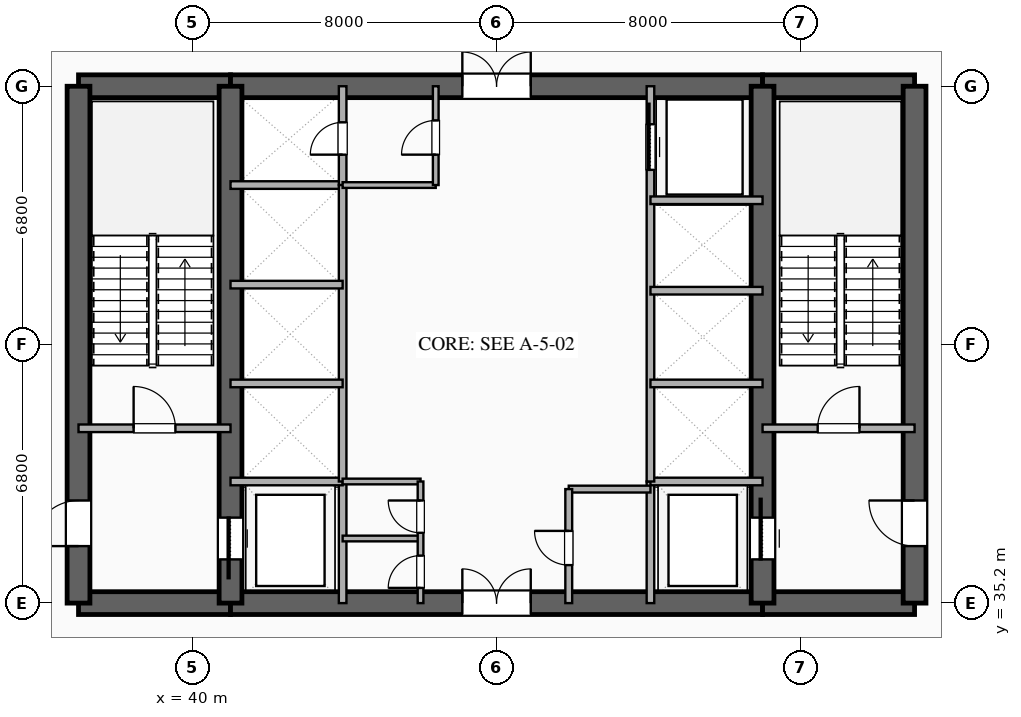
"""IFC4 building model, lengths in metres.
Left out: names, types, materials, properties, quantities, classifications, styles, units other than length and angle.
Written with IfcOpenShell. Run it as: python <this file> out.ifc"""

import sys

from ifc_helpers import new_model, si_unit, direction, frame, frame_2d, origin, place, context, subcontext, project, spatial, rectangle, extrude, element, fill, save


model = new_model("IFC4")
c1 = context("Model", 3, precision=1e-05, world=origin(), true_north=direction((0.0, 1.0)))
c2 = subcontext(c1, "Body", "Model", "MODEL_VIEW")
j1 = project(units=[si_unit("LENGTHUNIT", "METRE"), si_unit("PLANEANGLEUNIT", "RADIAN")], contexts=[c1])
p1 = place(None, origin())
s1 = spatial("IfcSite", under=j1, at=p1, CompositionType="ELEMENT")
p2 = place(p1, origin())
s2 = spatial("IfcBuilding", under=s1, at=p2, CompositionType="ELEMENT")
p3 = place(p2, frame((0.0, 0.0, -4.5)))
s3 = spatial("IfcBuildingStorey", under=s2, at=p3, CompositionType="ELEMENT", Elevation=-4.5)
p4 = place(p3, frame((37.0, 35.2, 0.0), z_axis=(0.0, 0.0, 1.0), x_axis=(1.0, 0.0, 0.0)))
e1 = element("IfcWall", 1, at=p4, inside=s3, PredefinedType="SHEAR", context=c2, shape_type="SweptSolid", body=[
    extrude(rectangle(XDim=4.0, YDim=0.6, at=frame_2d((2.0, 0.0))), origin(), (0.0, 0.0, 1.0), 4.22),
])
p5 = place(p3, frame((41.0, 35.2, 0.0), z_axis=(0.0, 0.0, 1.0), x_axis=(1.0, 0.0, 0.0)))
e2 = element("IfcWall", 2, at=p5, inside=s3, PredefinedType="SHEAR", context=c2, shape_type="SweptSolid", body=[
    extrude(rectangle(XDim=14.0, YDim=0.6, at=frame_2d((7.0, 0.0))), origin(), (0.0, 0.0, 1.0), 4.22),
])
p6 = place(p5, frame((6.1, 0.0, 0.0)))
e3 = element("IfcOpeningElement", 3, at=p6, cuts=e2, PredefinedType="OPENING", context=c2, shape_type="SweptSolid", body=[
    extrude(rectangle(XDim=1.8, YDim=2.25, at=frame_2d((0.9, 1.125))), frame((0.0, 0.31, 0.0), z_axis=(0.0, -1.0, 0.0), x_axis=(1.0, 0.0, 0.0)), (0.0, 0.0, 1.0), 0.62),
])
for number, where, z_axis, x_axis in (
    (4, (55.0, 35.2, 0.0), (0.0, 0.0, 1.0), (1.0, 0.0, 0.0)),
    (5, (37.0, 48.8, 0.0), (0.0, 0.0, 1.0), (1.0, 0.0, 0.0)),
):
    element("IfcWall", number, at=place(p3, frame(where, z_axis=z_axis, x_axis=x_axis)), inside=s3, PredefinedType="SHEAR", context=c2, shape_type="SweptSolid", body=[
        extrude(rectangle(XDim=4.0, YDim=0.6, at=frame_2d((2.0, 0.0))), origin(), (0.0, 0.0, 1.0), 4.22),
    ])
p7 = place(p3, frame((41.0, 48.8, 0.0), z_axis=(0.0, 0.0, 1.0), x_axis=(1.0, 0.0, 0.0)))
e6 = element("IfcWall", 6, at=p7, inside=s3, PredefinedType="SHEAR", context=c2, shape_type="SweptSolid", body=[
    extrude(rectangle(XDim=14.0, YDim=0.6, at=frame_2d((7.0, 0.0))), origin(), (0.0, 0.0, 1.0), 4.22),
])
p8 = place(p7, frame((6.1, 0.0, 0.0)))
e7 = element("IfcOpeningElement", 7, at=p8, cuts=e6, PredefinedType="OPENING", context=c2, shape_type="SweptSolid", body=[
    extrude(rectangle(XDim=1.8, YDim=2.25, at=frame_2d((0.9, 1.125))), frame((0.0, 0.31, 0.0), z_axis=(0.0, -1.0, 0.0), x_axis=(1.0, 0.0, 0.0)), (0.0, 0.0, 1.0), 0.62),
])
p9 = place(p3, frame((55.0, 48.8, 0.0), z_axis=(0.0, 0.0, 1.0), x_axis=(1.0, 0.0, 0.0)))
e8 = element("IfcWall", 8, at=p9, inside=s3, PredefinedType="SHEAR", context=c2, shape_type="SweptSolid", body=[
    extrude(rectangle(XDim=4.0, YDim=0.6, at=frame_2d((2.0, 0.0))), origin(), (0.0, 0.0, 1.0), 4.22),
])
p10 = place(p3, frame((37.0, 35.2, 0.0), z_axis=(0.0, 0.0, 1.0), x_axis=(0.0, 1.0, 0.0)))
e9 = element("IfcWall", 9, at=p10, inside=s3, PredefinedType="SHEAR", context=c2, shape_type="SweptSolid", body=[
    extrude(rectangle(XDim=13.6, YDim=0.6, at=frame_2d((6.8, 0.0))), origin(), (0.0, 0.0, 1.0), 4.22),
])
p11 = place(p10, frame((1.5, 0.0, 0.0)))
e10 = element("IfcOpeningElement", 10, at=p11, cuts=e9, PredefinedType="OPENING", context=c2, shape_type="SweptSolid", body=[
    extrude(rectangle(XDim=1.2, YDim=2.15, at=frame_2d((0.6, 1.075))), frame((0.0, 0.31, 0.0), z_axis=(0.0, -1.0, 0.0), x_axis=(1.0, 0.0, 0.0)), (0.0, 0.0, 1.0), 0.62),
])
p12 = place(p3, frame((59.0, 35.2, 0.0), z_axis=(0.0, 0.0, 1.0), x_axis=(0.0, 1.0, 0.0)))
e11 = element("IfcWall", 11, at=p12, inside=s3, PredefinedType="SHEAR", context=c2, shape_type="SweptSolid", body=[
    extrude(rectangle(XDim=13.6, YDim=0.6, at=frame_2d((6.8, 0.0))), origin(), (0.0, 0.0, 1.0), 4.22),
])
p13 = place(p12, frame((1.5, 0.0, 0.0)))
e12 = element("IfcOpeningElement", 12, at=p13, cuts=e11, PredefinedType="OPENING", context=c2, shape_type="SweptSolid", body=[
    extrude(rectangle(XDim=1.2, YDim=2.15, at=frame_2d((0.6, 1.075))), frame((0.0, 0.31, 0.0), z_axis=(0.0, -1.0, 0.0), x_axis=(1.0, 0.0, 0.0)), (0.0, 0.0, 1.0), 0.62),
])
p14 = place(p3, frame((41.0, 35.2, 0.0), z_axis=(0.0, 0.0, 1.0), x_axis=(0.0, 1.0, 0.0)))
e13 = element("IfcWall", 13, at=p14, inside=s3, PredefinedType="SHEAR", context=c2, shape_type="SweptSolid", body=[
    extrude(rectangle(XDim=13.6, YDim=0.6, at=frame_2d((6.8, 0.0))), origin(), (0.0, 0.0, 1.0), 4.22),
])
p15 = place(p14, frame((1.15, 0.0, 0.0)))
e14 = element("IfcOpeningElement", 14, at=p15, cuts=e13, PredefinedType="OPENING", context=c2, shape_type="SweptSolid", body=[
    extrude(rectangle(XDim=1.1, YDim=2.2, at=frame_2d((0.55, 1.1))), frame((0.0, 0.31, 0.0), z_axis=(0.0, -1.0, 0.0), x_axis=(1.0, 0.0, 0.0)), (0.0, 0.0, 1.0), 0.62),
])
p16 = place(p3, frame((55.0, 35.2, 0.0), z_axis=(0.0, 0.0, 1.0), x_axis=(0.0, 1.0, 0.0)))
e15 = element("IfcWall", 15, at=p16, inside=s3, PredefinedType="SHEAR", context=c2, shape_type="SweptSolid", body=[
    extrude(rectangle(XDim=13.6, YDim=0.6, at=frame_2d((6.8, 0.0))), origin(), (0.0, 0.0, 1.0), 4.22),
])
p17 = place(p16, frame((1.15, 0.0, 0.0)))
e16 = element("IfcOpeningElement", 16, at=p17, cuts=e15, PredefinedType="OPENING", context=c2, shape_type="SweptSolid", body=[
    extrude(rectangle(XDim=1.1, YDim=2.2, at=frame_2d((0.55, 1.1))), frame((0.0, 0.31, 0.0), z_axis=(0.0, -1.0, 0.0), x_axis=(1.0, 0.0, 0.0)), (0.0, 0.0, 1.0), 0.62),
])
p18 = place(p3, frame((37.0, 39.8, 0.0), z_axis=(0.0, 0.0, 1.0), x_axis=(1.0, 0.0, 0.0)))
e17 = element("IfcWall", 17, at=p18, inside=s3, PredefinedType="SOLIDWALL", context=c2, shape_type="SweptSolid", body=[
    extrude(rectangle(XDim=4.0, YDim=0.2, at=frame_2d((2.0, 0.0))), origin(), (0.0, 0.0, 1.0), 3.42),
])
p19 = place(p18, frame((1.45, 0.0, 0.0)))
e18 = element("IfcOpeningElement", 18, at=p19, cuts=e17, PredefinedType="OPENING", context=c2, shape_type="SweptSolid", body=[
    extrude(rectangle(XDim=1.1, YDim=2.15, at=frame_2d((0.55, 1.075))), frame((0.0, 0.11, 0.0), z_axis=(0.0, -1.0, 0.0), x_axis=(1.0, 0.0, 0.0)), (0.0, 0.0, 1.0), 0.22),
])
p20 = place(p3, frame((55.0, 39.8, 0.0), z_axis=(0.0, 0.0, 1.0), x_axis=(1.0, 0.0, 0.0)))
e19 = element("IfcWall", 19, at=p20, inside=s3, PredefinedType="SOLIDWALL", context=c2, shape_type="SweptSolid", body=[
    extrude(rectangle(XDim=4.0, YDim=0.2, at=frame_2d((2.0, 0.0))), origin(), (0.0, 0.0, 1.0), 3.42),
])
p21 = place(p20, frame((1.45, 0.0, 0.0)))
e20 = element("IfcOpeningElement", 20, at=p21, cuts=e19, PredefinedType="OPENING", context=c2, shape_type="SweptSolid", body=[
    extrude(rectangle(XDim=1.1, YDim=2.15, at=frame_2d((0.55, 1.075))), frame((0.0, 0.11, 0.0), z_axis=(0.0, -1.0, 0.0), x_axis=(1.0, 0.0, 0.0)), (0.0, 0.0, 1.0), 0.22),
])
p22 = place(p3, frame((43.95, 35.2, 0.0), z_axis=(0.0, 0.0, 1.0), x_axis=(0.0, 1.0, 0.0)))
e21 = element("IfcWall", 21, at=p22, inside=s3, PredefinedType="SOLIDWALL", context=c2, shape_type="SweptSolid", body=[
    extrude(rectangle(XDim=3.2, YDim=0.2, at=frame_2d((1.6, 0.0))), origin(), (0.0, 0.0, 1.0), 3.42),
])
p23 = place(p3, frame((41.0, 38.4, 0.0), z_axis=(0.0, 0.0, 1.0), x_axis=(1.0, 0.0, 0.0)))
e22 = element("IfcWall", 22, at=p23, inside=s3, PredefinedType="SOLIDWALL", context=c2, shape_type="SweptSolid", body=[
    extrude(rectangle(XDim=2.95, YDim=0.2, at=frame_2d((1.475, 0.0))), origin(), (0.0, 0.0, 1.0), 3.42),
])
p24 = place(p3, frame((52.05, 35.2, 0.0), z_axis=(0.0, 0.0, 1.0), x_axis=(0.0, 1.0, 0.0)))
e23 = element("IfcWall", 23, at=p24, inside=s3, PredefinedType="SOLIDWALL", context=c2, shape_type="SweptSolid", body=[
    extrude(rectangle(XDim=3.2, YDim=0.2, at=frame_2d((1.6, 0.0))), origin(), (0.0, 0.0, 1.0), 3.42),
])
for number, where, z_axis, x_axis in (
    (24, (52.05, 38.4, 0.0), (0.0, 0.0, 1.0), (1.0, 0.0, 0.0)),
    (25, (41.0, 46.2, 0.0), (0.0, 0.0, 1.0), (1.0, 0.0, 0.0)),
):
    element("IfcWall", number, at=place(p3, frame(where, z_axis=z_axis, x_axis=x_axis)), inside=s3, PredefinedType="SOLIDWALL", context=c2, shape_type="SweptSolid", body=[
        extrude(rectangle(XDim=2.95, YDim=0.2, at=frame_2d((1.475, 0.0))), origin(), (0.0, 0.0, 1.0), 3.42),
    ])
p25 = place(p3, frame((43.95, 46.2, 0.0), z_axis=(0.0, 0.0, 1.0), x_axis=(0.0, 1.0, 0.0)))
e26 = element("IfcWall", 26, at=p25, inside=s3, PredefinedType="SOLIDWALL", context=c2, shape_type="SweptSolid", body=[
    extrude(rectangle(XDim=2.6, YDim=0.2, at=frame_2d((1.3, 0.0))), origin(), (0.0, 0.0, 1.0), 3.42),
])
p26 = place(p25, frame((0.8, 0.0, 0.0)))
e27 = element("IfcOpeningElement", 27, at=p26, cuts=e26, PredefinedType="OPENING", context=c2, shape_type="SweptSolid", body=[
    extrude(rectangle(XDim=0.85, YDim=2.15, at=frame_2d((0.425, 1.075))), frame((0.0, 0.11, 0.0), z_axis=(0.0, -1.0, 0.0), x_axis=(1.0, 0.0, 0.0)), (0.0, 0.0, 1.0), 0.22),
])
p27 = place(p3, frame((43.95, 38.4, 0.0), z_axis=(0.0, 0.0, 1.0), x_axis=(0.0, 1.0, 0.0)))
e28 = element("IfcWall", 28, at=p27, inside=s3, PredefinedType="SOLIDWALL", context=c2, shape_type="SweptSolid", body=[
    extrude(rectangle(XDim=7.8, YDim=0.2, at=frame_2d((3.9, 0.0))), origin(), (0.0, 0.0, 1.0), 3.42),
])
for number, where, z_axis, x_axis in (
    (29, (41.0, 40.98, 0.0), (0.0, 0.0, 1.0), (1.0, 0.0, 0.0)),
    (30, (41.0, 43.58, 0.0), (0.0, 0.0, 1.0), (1.0, 0.0, 0.0)),
):
    element("IfcWall", number, at=place(p3, frame(where, z_axis=z_axis, x_axis=x_axis)), inside=s3, PredefinedType="SOLIDWALL", context=c2, shape_type="SweptSolid", body=[
        extrude(rectangle(XDim=2.95, YDim=0.2, at=frame_2d((1.475, 0.0))), origin(), (0.0, 0.0, 1.0), 3.42),
    ])
p28 = place(p3, frame((52.05, 38.4, 0.0), z_axis=(0.0, 0.0, 1.0), x_axis=(0.0, 1.0, 0.0)))
e31 = element("IfcWall", 31, at=p28, inside=s3, PredefinedType="SOLIDWALL", context=c2, shape_type="SweptSolid", body=[
    extrude(rectangle(XDim=10.4, YDim=0.2, at=frame_2d((5.2, 0.0))), origin(), (0.0, 0.0, 1.0), 3.42),
])
p29 = place(p28, frame((8.2, 0.0, 0.0)))
e32 = element("IfcOpeningElement", 32, at=p29, cuts=e31, PredefinedType="OPENING", context=c2, shape_type="SweptSolid", body=[
    extrude(rectangle(XDim=1.2, YDim=2.2, at=frame_2d((0.6, 1.1))), frame((0.0, 0.11, 0.0), z_axis=(0.0, -1.0, 0.0), x_axis=(1.0, 0.0, 0.0)), (0.0, 0.0, 1.0), 0.22),
])
for number, where, z_axis, x_axis in (
    (33, (52.05, 40.98, 0.0), (0.0, 0.0, 1.0), (1.0, 0.0, 0.0)),
    (34, (52.05, 43.42, 0.0), (0.0, 0.0, 1.0), (1.0, 0.0, 0.0)),
    (35, (52.05, 45.8, 0.0), (0.0, 0.0, 1.0), (1.0, 0.0, 0.0)),
):
    element("IfcWall", number, at=place(p3, frame(where, z_axis=z_axis, x_axis=x_axis)), inside=s3, PredefinedType="SOLIDWALL", context=c2, shape_type="SweptSolid", body=[
        extrude(rectangle(XDim=2.95, YDim=0.2, at=frame_2d((1.475, 0.0))), origin(), (0.0, 0.0, 1.0), 3.42),
    ])
for number, where, z_axis, x_axis in (
    (36, (43.95, 36.9, 0.0), (0.0, 0.0, 1.0), (1.0, 0.0, 0.0)),
    (37, (43.95, 38.4, 0.0), (0.0, 0.0, 1.0), (1.0, 0.0, 0.0)),
):
    element("IfcWall", number, at=place(p3, frame(where, z_axis=z_axis, x_axis=x_axis)), inside=s3, PredefinedType="PARTITIONING", context=c2, shape_type="SweptSolid", body=[
        extrude(rectangle(XDim=2.05, YDim=0.15, at=frame_2d((1.025, 0.0))), origin(), (0.0, 0.0, 1.0), 3.42),
    ])
p30 = place(p3, frame((46.0, 35.2, 0.0), z_axis=(0.0, 0.0, 1.0), x_axis=(0.0, 1.0, 0.0)))
e38 = element("IfcWall", 38, at=p30, inside=s3, PredefinedType="PARTITIONING", context=c2, shape_type="SweptSolid", body=[
    extrude(rectangle(XDim=3.2, YDim=0.15, at=frame_2d((1.6, 0.0))), origin(), (0.0, 0.0, 1.0), 3.42),
])
p31 = place(p30, frame((0.4, 0.0, 0.0)))
e39 = element("IfcOpeningElement", 39, at=p31, cuts=e38, PredefinedType="OPENING", context=c2, shape_type="SweptSolid", body=[
    extrude(rectangle(XDim=0.85, YDim=2.15, at=frame_2d((0.425, 1.075))), frame((0.0, 0.085, 0.0), z_axis=(0.0, -1.0, 0.0), x_axis=(1.0, 0.0, 0.0)), (0.0, 0.0, 1.0), 0.17),
])
p32 = place(p30, frame((1.85, 0.0, 0.0)))
e40 = element("IfcOpeningElement", 40, at=p32, cuts=e38, PredefinedType="OPENING", context=c2, shape_type="SweptSolid", body=[
    extrude(rectangle(XDim=0.85, YDim=2.15, at=frame_2d((0.425, 1.075))), frame((0.0, 0.085, 0.0), z_axis=(0.0, -1.0, 0.0), x_axis=(1.0, 0.0, 0.0)), (0.0, 0.0, 1.0), 0.17),
])
p33 = place(p3, frame((43.95, 46.2, 0.0), z_axis=(0.0, 0.0, 1.0), x_axis=(1.0, 0.0, 0.0)))
e41 = element("IfcWall", 41, at=p33, inside=s3, PredefinedType="PARTITIONING", context=c2, shape_type="SweptSolid", body=[
    extrude(rectangle(XDim=2.45, YDim=0.15, at=frame_2d((1.225, 0.0))), origin(), (0.0, 0.0, 1.0), 3.42),
])
p34 = place(p3, frame((46.4, 46.2, 0.0), z_axis=(0.0, 0.0, 1.0), x_axis=(0.0, 1.0, 0.0)))
e42 = element("IfcWall", 42, at=p34, inside=s3, PredefinedType="PARTITIONING", context=c2, shape_type="SweptSolid", body=[
    extrude(rectangle(XDim=2.6, YDim=0.15, at=frame_2d((1.3, 0.0))), origin(), (0.0, 0.0, 1.0), 3.42),
])
p35 = place(p34, frame((0.8, 0.0, 0.0)))
e43 = element("IfcOpeningElement", 43, at=p35, cuts=e42, PredefinedType="OPENING", context=c2, shape_type="SweptSolid", body=[
    extrude(rectangle(XDim=0.9, YDim=2.15, at=frame_2d((0.45, 1.075))), frame((0.0, 0.085, 0.0), z_axis=(0.0, -1.0, 0.0), x_axis=(1.0, 0.0, 0.0)), (0.0, 0.0, 1.0), 0.17),
])
p36 = place(p3, frame((49.9, 38.2, 0.0), z_axis=(0.0, 0.0, 1.0), x_axis=(1.0, 0.0, 0.0)))
e44 = element("IfcWall", 44, at=p36, inside=s3, PredefinedType="PLUMBINGWALL", context=c2, shape_type="SweptSolid", body=[
    extrude(rectangle(XDim=2.15, YDim=0.18, at=frame_2d((1.075, 0.0))), origin(), (0.0, 0.0, 1.0), 3.42),
])
p37 = place(p3, frame((49.9, 35.2, 0.0), z_axis=(0.0, 0.0, 1.0), x_axis=(0.0, 1.0, 0.0)))
e45 = element("IfcWall", 45, at=p37, inside=s3, PredefinedType="PLUMBINGWALL", context=c2, shape_type="SweptSolid", body=[
    extrude(rectangle(XDim=3.0, YDim=0.18, at=frame_2d((1.5, 0.0))), origin(), (0.0, 0.0, 1.0), 3.42),
])
p38 = place(p37, frame((1.0, 0.0, 0.0)))
e46 = element("IfcOpeningElement", 46, at=p38, cuts=e45, PredefinedType="OPENING", context=c2, shape_type="SweptSolid", body=[
    extrude(rectangle(XDim=0.9, YDim=2.1, at=frame_2d((0.45, 1.05))), frame((0.0, 0.1, 0.0), z_axis=(0.0, -1.0, 0.0), x_axis=(1.0, 0.0, 0.0)), (0.0, 0.0, 1.0), 0.2),
])
p39 = place(p15, origin())
e47 = element("IfcDoor", 47, at=p39, inside=s3, OperationType="SLIDING_TO_LEFT", PredefinedType="DOOR", context=c2, shape_type="SweptSolid", body=[
    extrude(rectangle(XDim=1.1, YDim=2.2, at=frame_2d((0.55, 1.1))), frame((0.0, 0.025, 0.0), z_axis=(0.0, -1.0, 0.0), x_axis=(1.0, 0.0, 0.0)), (0.0, 0.0, 1.0), 0.05),
])
fill(e14, e47)
p40 = place(p17, origin())
e48 = element("IfcDoor", 48, at=p40, inside=s3, OperationType="SLIDING_TO_RIGHT", PredefinedType="DOOR", context=c2, shape_type="SweptSolid", body=[
    extrude(rectangle(XDim=1.1, YDim=2.2, at=frame_2d((0.55, 1.1))), frame((0.0, 0.025, 0.0), z_axis=(0.0, -1.0, 0.0), x_axis=(1.0, 0.0, 0.0)), (0.0, 0.0, 1.0), 0.05),
])
fill(e16, e48)
p41 = place(p11, origin())
e49 = element("IfcDoor", 49, at=p41, inside=s3, OperationType="SINGLE_SWING_LEFT", PredefinedType="DOOR", context=c2, shape_type="SweptSolid", body=[
    extrude(rectangle(XDim=1.2, YDim=2.15, at=frame_2d((0.6, 1.075))), frame((0.0, 0.025, 0.0), z_axis=(0.0, -1.0, 0.0), x_axis=(1.0, 0.0, 0.0)), (0.0, 0.0, 1.0), 0.05),
])
fill(e10, e49)
p42 = place(p13, origin())
e50 = element("IfcDoor", 50, at=p42, inside=s3, OperationType="SINGLE_SWING_RIGHT", PredefinedType="DOOR", context=c2, shape_type="SweptSolid", body=[
    extrude(rectangle(XDim=1.2, YDim=2.15, at=frame_2d((0.6, 1.075))), frame((0.0, 0.025, 0.0), z_axis=(0.0, -1.0, 0.0), x_axis=(1.0, 0.0, 0.0)), (0.0, 0.0, 1.0), 0.05),
])
fill(e12, e50)
p43 = place(p6, origin())
e51 = element("IfcDoor", 51, at=p43, inside=s3, OperationType="DOUBLE_DOOR_SINGLE_SWING", PredefinedType="DOOR", context=c2, shape_type="SweptSolid", body=[
    extrude(rectangle(XDim=1.8, YDim=2.25, at=frame_2d((0.9, 1.125))), frame((0.0, 0.025, 0.0), z_axis=(0.0, -1.0, 0.0), x_axis=(1.0, 0.0, 0.0)), (0.0, 0.0, 1.0), 0.05),
])
fill(e3, e51)
p44 = place(p8, origin())
e52 = element("IfcDoor", 52, at=p44, inside=s3, OperationType="DOUBLE_DOOR_SINGLE_SWING", PredefinedType="DOOR", context=c2, shape_type="SweptSolid", body=[
    extrude(rectangle(XDim=1.8, YDim=2.25, at=frame_2d((0.9, 1.125))), frame((0.0, 0.025, 0.0), z_axis=(0.0, -1.0, 0.0), x_axis=(1.0, 0.0, 0.0)), (0.0, 0.0, 1.0), 0.05),
])
fill(e7, e52)
p45 = place(p19, origin())
e53 = element("IfcDoor", 53, at=p45, inside=s3, OperationType="SINGLE_SWING_LEFT", PredefinedType="DOOR", context=c2, shape_type="SweptSolid", body=[
    extrude(rectangle(XDim=1.1, YDim=2.15, at=frame_2d((0.55, 1.075))), frame((0.0, 0.025, 0.0), z_axis=(0.0, -1.0, 0.0), x_axis=(1.0, 0.0, 0.0)), (0.0, 0.0, 1.0), 0.05),
])
fill(e18, e53)
p46 = place(p21, origin())
e54 = element("IfcDoor", 54, at=p46, inside=s3, OperationType="SINGLE_SWING_RIGHT", PredefinedType="DOOR", context=c2, shape_type="SweptSolid", body=[
    extrude(rectangle(XDim=1.1, YDim=2.15, at=frame_2d((0.55, 1.075))), frame((0.0, 0.025, 0.0), z_axis=(0.0, -1.0, 0.0), x_axis=(1.0, 0.0, 0.0)), (0.0, 0.0, 1.0), 0.05),
])
fill(e20, e54)
p47 = place(p26, origin())
e55 = element("IfcDoor", 55, at=p47, inside=s3, OperationType="SINGLE_SWING_LEFT", PredefinedType="DOOR", context=c2, shape_type="SweptSolid", body=[
    extrude(rectangle(XDim=0.85, YDim=2.15, at=frame_2d((0.425, 1.075))), frame((0.0, 0.025, 0.0), z_axis=(0.0, -1.0, 0.0), x_axis=(1.0, 0.0, 0.0)), (0.0, 0.0, 1.0), 0.05),
])
fill(e27, e55)
p48 = place(p29, origin())
e56 = element("IfcDoor", 56, at=p48, inside=s3, OperationType="SLIDING_TO_RIGHT", PredefinedType="DOOR", context=c2, shape_type="SweptSolid", body=[
    extrude(rectangle(XDim=1.2, YDim=2.2, at=frame_2d((0.6, 1.1))), frame((0.0, 0.025, 0.0), z_axis=(0.0, -1.0, 0.0), x_axis=(1.0, 0.0, 0.0)), (0.0, 0.0, 1.0), 0.05),
])
fill(e32, e56)
p49 = place(p31, origin())
e57 = element("IfcDoor", 57, at=p49, inside=s3, OperationType="SINGLE_SWING_LEFT", PredefinedType="DOOR", context=c2, shape_type="SweptSolid", body=[
    extrude(rectangle(XDim=0.85, YDim=2.15, at=frame_2d((0.425, 1.075))), frame((0.0, 0.025, 0.0), z_axis=(0.0, -1.0, 0.0), x_axis=(1.0, 0.0, 0.0)), (0.0, 0.0, 1.0), 0.05),
])
fill(e39, e57)
p50 = place(p32, origin())
e58 = element("IfcDoor", 58, at=p50, inside=s3, OperationType="SINGLE_SWING_RIGHT", PredefinedType="DOOR", context=c2, shape_type="SweptSolid", body=[
    extrude(rectangle(XDim=0.85, YDim=2.15, at=frame_2d((0.425, 1.075))), frame((0.0, 0.025, 0.0), z_axis=(0.0, -1.0, 0.0), x_axis=(1.0, 0.0, 0.0)), (0.0, 0.0, 1.0), 0.05),
])
fill(e40, e58)
p51 = place(p35, origin())
e59 = element("IfcDoor", 59, at=p51, inside=s3, OperationType="SINGLE_SWING_LEFT", PredefinedType="DOOR", context=c2, shape_type="SweptSolid", body=[
    extrude(rectangle(XDim=0.9, YDim=2.15, at=frame_2d((0.45, 1.075))), frame((0.0, 0.025, 0.0), z_axis=(0.0, -1.0, 0.0), x_axis=(1.0, 0.0, 0.0)), (0.0, 0.0, 1.0), 0.05),
])
fill(e43, e59)
p52 = place(p38, origin())
e60 = element("IfcDoor", 60, at=p52, inside=s3, OperationType="SINGLE_SWING_RIGHT", PredefinedType="DOOR", context=c2, shape_type="SweptSolid", body=[
    extrude(rectangle(XDim=0.9, YDim=2.1, at=frame_2d((0.45, 1.05))), frame((0.0, 0.025, 0.0), z_axis=(0.0, -1.0, 0.0), x_axis=(1.0, 0.0, 0.0)), (0.0, 0.0, 1.0), 0.05),
])
fill(e46, e60)
save(model, sys.argv[1])
